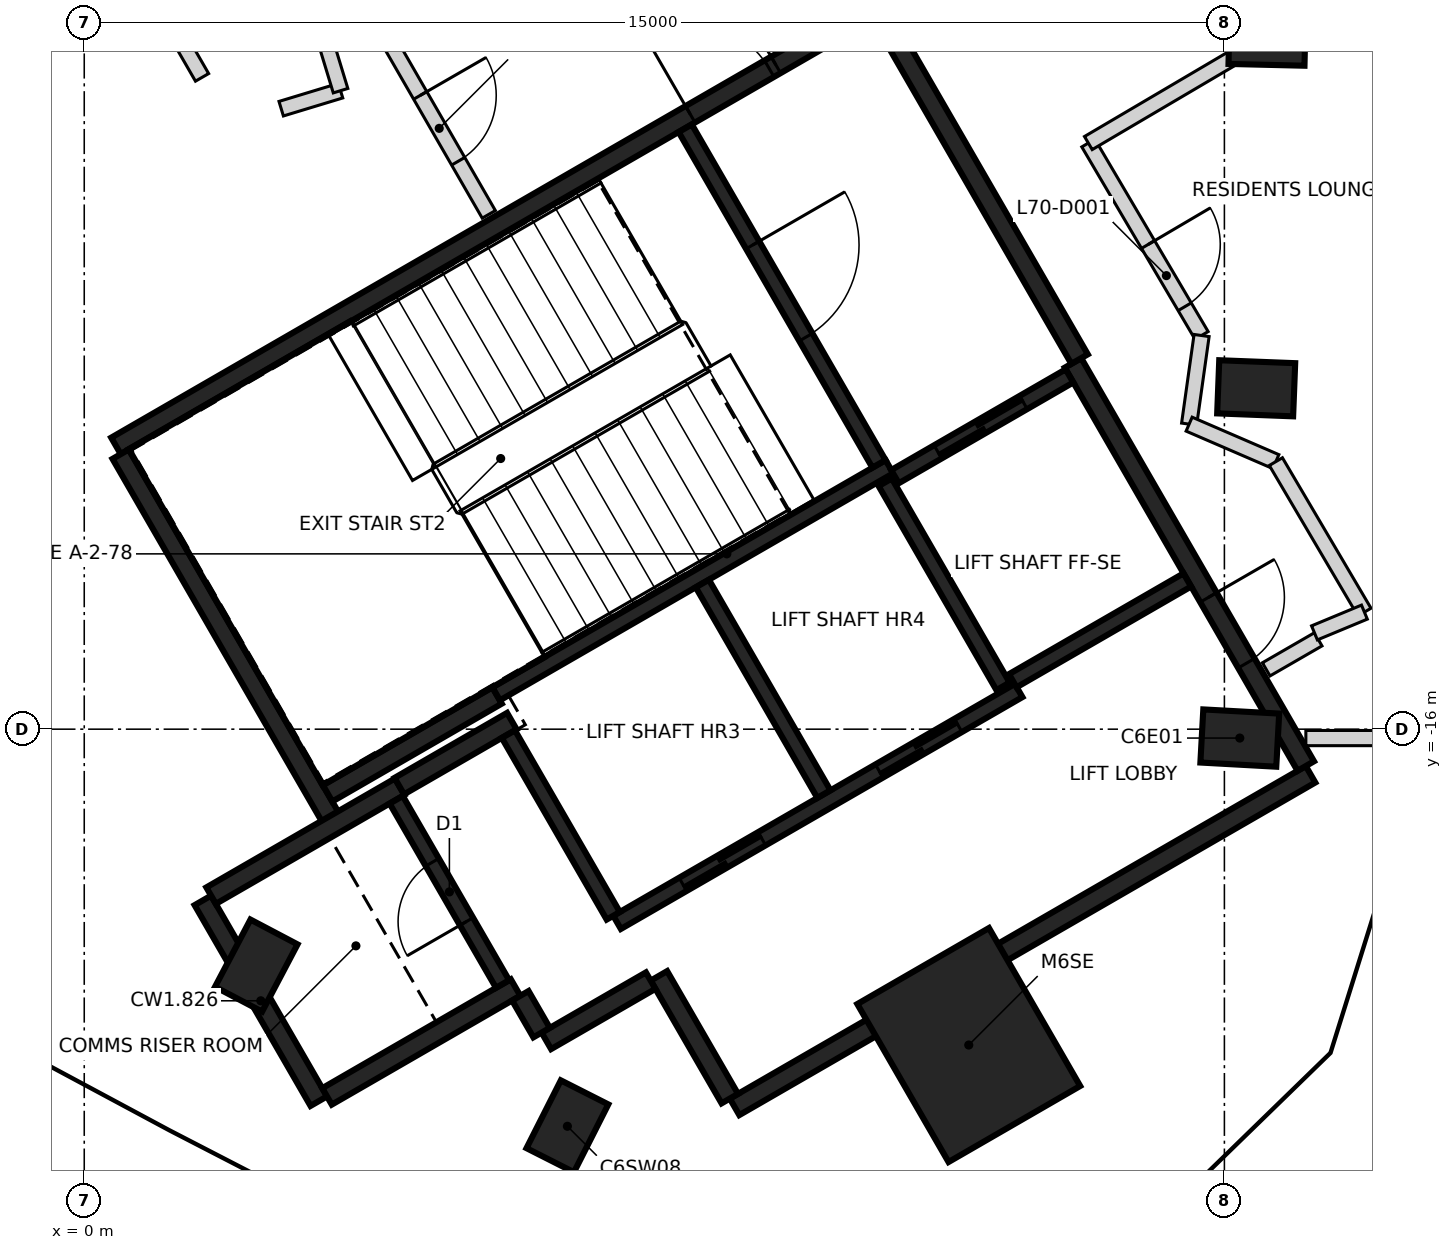
"""IFC4 building model, lengths in metres.
Left out: names, types, materials, properties, quantities, classifications, styles, units other than length and angle.
Written with IfcOpenShell. Run it as: python <this file> out.ifc"""

import sys

from ifc_helpers import new_model, si_unit, direction, frame, frame_2d, origin, origin_2d, place, context, subcontext, project, spatial, rectangle, extrude, element, fill, save


model = new_model("IFC4")
c1 = context("Model", 3, precision=1e-05, world=origin(), true_north=direction((0.0, 1.0)))
c2 = subcontext(c1, "Body", "Model", "MODEL_VIEW")
j1 = project(units=[si_unit("LENGTHUNIT", "METRE"), si_unit("PLANEANGLEUNIT", "RADIAN")], contexts=[c1])
p1 = place(None, origin())
s1 = spatial("IfcSite", under=j1, at=p1, CompositionType="ELEMENT")
p2 = place(p1, origin())
s2 = spatial("IfcBuilding", under=s1, at=p2, CompositionType="ELEMENT")
p3 = place(p2, frame((0.0, 0.0, 276.6)))
s3 = spatial("IfcBuildingStorey", under=s2, at=p3, CompositionType="ELEMENT", Elevation=276.6)
for number, where, z_axis, x_axis in (
    (1, (15.202, -16.117, -0.35), (0.0, 0.0, 1.0), (-0.998, 0.055, 0.0)),
    (2, (15.418, -11.515, -0.35), (0.0, 0.0, 1.0), (-0.999, 0.039, 0.0)),
    (3, (15.562, -6.91, -0.35), (0.0, 0.0, 1.0), (-1.0, 0.024, 0.0)),
    (4, (2.263, -19.11, -0.35), (0.0, 0.0, 1.0), (0.466, 0.885, 0.0)),
    (5, (6.356, -21.224, -0.35), (0.0, 0.0, 1.0), (0.452, 0.892, 0.0)),
):
    element("IfcColumn", number, at=place(p3, frame(where, z_axis=z_axis, x_axis=x_axis)), inside=s3, PredefinedType="COLUMN", context=c2, shape_type="SweptSolid", body=[
        extrude(rectangle(XDim=1.0, YDim=0.7, at=origin_2d()), origin(), (0.0, 0.0, 1.0), 3.6),
    ])
p4 = place(p3, frame((11.637, -20.155, -0.35), z_axis=(0.0, 0.0, 1.0), x_axis=(-0.5, 0.866025403784, 0.0)))
e6 = element("IfcColumn", 6, at=p4, inside=s3, PredefinedType="COLUMN", context=c2, shape_type="SweptSolid", body=[
    extrude(rectangle(XDim=2.4, YDim=2.0, at=origin_2d()), origin(), (0.0, 0.0, 1.0), 3.6),
])
p5 = place(p3, frame((0.417, -12.273, 0.0), z_axis=(0.0, 0.0, 1.0), x_axis=(0.866021906294, 0.500006057782, 0.0)))
e7 = element("IfcWall", 7, at=p5, inside=s3, PredefinedType="SHEAR", context=c2, shape_type="SweptSolid", body=[
    extrude(rectangle(XDim=11.55, YDim=0.25, at=frame_2d((5.775, 0.0))), origin(), (0.0, 0.0, 1.0), 3.25),
])
p6 = place(p5, frame((10.025, 0.0, 0.0)))
e8 = element("IfcOpeningElement", 8, at=p6, cuts=e7, PredefinedType="OPENING", context=c2, shape_type="SweptSolid", body=[
    extrude(rectangle(XDim=1.2, YDim=2.1, at=frame_2d((0.6, 1.05))), frame((0.0, 0.135, 0.0), z_axis=(0.0, -1.0, 0.0), x_axis=(1.0, 0.0, 0.0)), (0.0, 0.0, 1.0), 0.27),
])
p7 = place(p5, frame((8.725, 0.0, 0.0)))
e9 = element("IfcOpeningElement", 9, at=p7, cuts=e7, PredefinedType="OPENING", context=c2, shape_type="SweptSolid", body=[
    extrude(rectangle(XDim=1.2, YDim=2.1, at=frame_2d((0.6, 1.05))), frame((0.0, 0.135, 0.0), z_axis=(0.0, -1.0, 0.0), x_axis=(1.0, 0.0, 0.0)), (0.0, 0.0, 1.0), 0.27),
])
p8 = place(p3, frame((16.133, -16.594, 0.0), z_axis=(0.0, 0.0, 1.0), x_axis=(-0.866022959057, -0.500004234368, 0.0)))
e10 = element("IfcWall", 10, at=p8, inside=s3, PredefinedType="SHEAR", context=c2, shape_type="SweptSolid", body=[
    extrude(rectangle(XDim=8.75, YDim=0.25, at=frame_2d((4.375, 0.0))), origin(), (0.0, 0.0, 1.0), 3.25),
])
p9 = place(p3, frame((13.008, -11.181, 0.0), z_axis=(0.0, 0.0, 1.0), x_axis=(0.500001955336, -0.866024274868, 0.0)))
e11 = element("IfcWall", 11, at=p9, inside=s3, PredefinedType="SHEAR", context=c2, shape_type="SweptSolid", body=[
    extrude(rectangle(XDim=6.125, YDim=0.25, at=frame_2d((3.062, 0.0))), origin(), (0.0, 0.0, 1.0), 3.25),
])
p10 = place(p9, frame((3.563, 0.0, 0.0)))
e12 = element("IfcOpeningElement", 12, at=p10, cuts=e11, PredefinedType="OPENING", context=c2, shape_type="SweptSolid", body=[
    extrude(rectangle(XDim=1.0, YDim=2.1, at=frame_2d((0.5, 1.05))), frame((0.0, 0.135, 0.0), z_axis=(0.0, -1.0, 0.0), x_axis=(1.0, 0.0, 0.0)), (0.0, 0.0, 1.0), 0.27),
])
p11 = place(p3, frame((3.235, -17.153, 0.0), z_axis=(0.0, 0.0, 1.0), x_axis=(-0.500008851346, 0.866020293397, 0.0)))
e13 = element("IfcWall", 13, at=p11, inside=s3, PredefinedType="SHEAR", context=c2, shape_type="SweptSolid", body=[
    extrude(rectangle(XDim=5.51, YDim=0.25, at=frame_2d((2.755, 0.0))), origin(), (0.0, 0.0, 1.0), 3.25),
])
p12 = place(p3, frame((10.483, -6.606, 0.0), z_axis=(0.0, 0.0, 1.0), x_axis=(0.49999885962, -0.866026062182, 0.0)))
e14 = element("IfcWall", 14, at=p12, inside=s3, PredefinedType="SHEAR", context=c2, shape_type="SweptSolid", body=[
    extrude(rectangle(XDim=5.225, YDim=0.25, at=frame_2d((2.612, 0.0))), origin(), (0.0, 0.0, 1.0), 3.25),
])
p13 = place(p3, frame((3.085, -20.894, 0.0), z_axis=(0.0, 0.0, 1.0), x_axis=(-0.499978833458, 0.866037623948, 0.0)))
e15 = element("IfcWall", 15, at=p13, inside=s3, PredefinedType="SHEAR", context=c2, shape_type="SweptSolid", body=[
    extrude(rectangle(XDim=3.05, YDim=0.25, at=frame_2d((1.525, 0.0))), origin(), (0.0, 0.0, 1.0), 3.25),
])
p14 = place(p3, frame((1.669, -18.19, 0.0), z_axis=(0.0, 0.0, 1.0), x_axis=(0.866042235819, 0.499970844928, 0.0)))
e16 = element("IfcWall", 16, at=p14, inside=s3, PredefinedType="SHEAR", context=c2, shape_type="SweptSolid", body=[
    extrude(rectangle(XDim=2.865, YDim=0.25, at=frame_2d((1.432, 0.0))), origin(), (0.0, 0.0, 1.0), 3.25),
])
p15 = place(p3, frame((5.675, -19.399, 0.0), z_axis=(0.0, 0.0, 1.0), x_axis=(-0.866026637627, -0.499997862916, 0.0)))
e17 = element("IfcWall", 17, at=p15, inside=s3, PredefinedType="SHEAR", context=c2, shape_type="SweptSolid", body=[
    extrude(rectangle(XDim=2.865, YDim=0.25, at=frame_2d((1.432, 0.0))), origin(), (0.0, 0.0, 1.0), 3.25),
])
p16 = place(p3, frame((5.431, -15.556, 0.0), z_axis=(0.0, 0.0, 1.0), x_axis=(-0.866022940537, -0.500004266446, 0.0)))
e18 = element("IfcWall", 18, at=p16, inside=s3, PredefinedType="SHEAR", context=c2, shape_type="SweptSolid", body=[
    extrude(rectangle(XDim=2.575, YDim=0.25, at=frame_2d((1.287, 0.0))), origin(), (0.0, 0.0, 1.0), 3.25),
])
p17 = place(p3, frame((8.493, -20.86, 0.0), z_axis=(0.0, 0.0, 1.0), x_axis=(-0.500039802285, 0.866002422705, 0.0)))
e19 = element("IfcWall", 19, at=p17, inside=s3, PredefinedType="SHEAR", context=c2, shape_type="SweptSolid", body=[
    extrude(rectangle(XDim=1.865, YDim=0.25, at=frame_2d((0.932, 0.0))), origin(), (0.0, 0.0, 1.0), 3.25),
])
p18 = place(p3, frame((4.145, -16.749, 0.0), z_axis=(0.0, 0.0, 1.0), x_axis=(0.866038183914, 0.499977863513, 0.0)))
e20 = element("IfcWall", 20, at=p18, inside=s3, PredefinedType="SHEAR", context=c2, shape_type="SweptSolid", body=[
    extrude(rectangle(XDim=1.71, YDim=0.25, at=frame_2d((0.855, 0.0))), origin(), (0.0, 0.0, 1.0), 3.25),
])
p19 = place(p3, frame((7.452, -19.308, 0.0), z_axis=(0.0, 0.0, 1.0), x_axis=(-0.866044474677, -0.49996696679, 0.0)))
e21 = element("IfcWall", 21, at=p19, inside=s3, PredefinedType="SHEAR", context=c2, shape_type="SweptSolid", body=[
    extrude(rectangle(XDim=1.584, YDim=0.25, at=frame_2d((0.792, 0.0))), origin(), (0.0, 0.0, 1.0), 3.25),
])
p20 = place(p3, frame((6.017, -19.992, 0.0), z_axis=(0.0, 0.0, 1.0), x_axis=(-0.500364886717, 0.865814633822, 0.0)))
e22 = element("IfcWall", 22, at=p20, inside=s3, PredefinedType="SHEAR", context=c2, shape_type="SweptSolid", body=[
    extrude(rectangle(XDim=0.559, YDim=0.25, at=frame_2d((0.28, 0.0))), origin(), (0.0, 0.0, 1.0), 3.25),
])
p21 = place(p3, frame((5.419, -15.534, 0.0), z_axis=(0.0, 0.0, 1.0), x_axis=(0.866029065029, 0.499993658486, 0.0)))
e23 = element("IfcWall", 23, at=p21, inside=s3, PredefinedType="SHEAR", context=c2, shape_type="SweptSolid", body=[
    extrude(rectangle(XDim=5.974, YDim=0.2, at=frame_2d((2.987, 0.0))), origin(), (0.0, 0.0, 1.0), 3.25),
])
p22 = place(p3, frame((7.01, -18.542, 0.0), z_axis=(0.0, 0.0, 1.0), x_axis=(0.866030299012, 0.499991521122, 0.0)))
e24 = element("IfcWall", 24, at=p22, inside=s3, PredefinedType="SHEAR", context=c2, shape_type="SweptSolid", body=[
    extrude(rectangle(XDim=6.1, YDim=0.2, at=frame_2d((3.05, 0.0))), origin(), (0.0, 0.0, 1.0), 3.25),
])
p23 = place(p22, frame((1.0, 0.0, 0.0)))
e25 = element("IfcOpeningElement", 25, at=p23, cuts=e24, PredefinedType="OPENING", context=c2, shape_type="SweptSolid", body=[
    extrude(rectangle(XDim=1.2, YDim=2.1, at=frame_2d((0.6, 1.05))), frame((0.0, 0.11, 0.0), z_axis=(0.0, -1.0, 0.0), x_axis=(1.0, 0.0, 0.0)), (0.0, 0.0, 1.0), 0.22),
])
p24 = place(p22, frame((3.982, 0.0, 0.0)))
e26 = element("IfcOpeningElement", 26, at=p24, cuts=e24, PredefinedType="OPENING", context=c2, shape_type="SweptSolid", body=[
    extrude(rectangle(XDim=1.2, YDim=2.1, at=frame_2d((0.6, 1.05))), frame((0.0, 0.11, 0.0), z_axis=(0.0, -1.0, 0.0), x_axis=(1.0, 0.0, 0.0)), (0.0, 0.0, 1.0), 0.22),
])
p25 = place(p3, frame((7.906, -8.094, 0.0), z_axis=(0.0, 0.0, 1.0), x_axis=(0.500027839223, -0.866009330205, 0.0)))
e27 = element("IfcWall", 27, at=p25, inside=s3, PredefinedType="SHEAR", context=c2, shape_type="SweptSolid", body=[
    extrude(rectangle(XDim=5.098, YDim=0.2, at=frame_2d((2.549, 0.0))), origin(), (0.0, 0.0, 1.0), 3.25),
])
p26 = place(p25, frame((1.774, 0.0, 0.0)))
e28 = element("IfcOpeningElement", 28, at=p26, cuts=e27, PredefinedType="OPENING", context=c2, shape_type="SweptSolid", body=[
    extrude(rectangle(XDim=1.4, YDim=2.1, at=frame_2d((0.7, 1.05))), frame((0.0, 0.11, 0.0), z_axis=(0.0, -1.0, 0.0), x_axis=(1.0, 0.0, 0.0)), (0.0, 0.0, 1.0), 0.22),
])
p27 = place(p3, frame((8.132, -14.084, 0.0), z_axis=(0.0, 0.0, 1.0), x_axis=(0.499997778408, -0.866026686418, 0.0)))
e29 = element("IfcWall", 29, at=p27, inside=s3, PredefinedType="SHEAR", context=c2, shape_type="SweptSolid", body=[
    extrude(rectangle(XDim=3.198, YDim=0.2, at=frame_2d((1.599, 0.0))), origin(), (0.0, 0.0, 1.0), 3.25),
])
p28 = place(p3, frame((5.503, -19.352, 0.0), z_axis=(0.0, 0.0, 1.0), x_axis=(-0.499986818241, 0.866033014143, 0.0)))
e30 = element("IfcWall", 30, at=p28, inside=s3, PredefinedType="SHEAR", context=c2, shape_type="SweptSolid", body=[
    extrude(rectangle(XDim=2.798, YDim=0.2, at=frame_2d((1.399, 0.0))), origin(), (0.0, 0.0, 1.0), 3.25),
])
p29 = place(p28, frame((0.949, 0.0, 0.0)))
e31 = element("IfcOpeningElement", 31, at=p29, cuts=e30, PredefinedType="OPENING", context=c2, shape_type="SweptSolid", body=[
    extrude(rectangle(XDim=0.9, YDim=2.1, at=frame_2d((0.45, 1.05))), frame((0.0, 0.11, 0.0), z_axis=(0.0, -1.0, 0.0), x_axis=(1.0, 0.0, 0.0)), (0.0, 0.0, 1.0), 0.22),
])
p30 = place(p3, frame((6.96, -18.455, 0.0), z_axis=(0.0, 0.0, 1.0), x_axis=(-0.499926705758, 0.866067716099, 0.0)))
e32 = element("IfcWall", 32, at=p30, inside=s3, PredefinedType="SHEAR", context=c2, shape_type="SweptSolid", body=[
    extrude(rectangle(XDim=2.759, YDim=0.2, at=frame_2d((1.38, 0.0))), origin(), (0.0, 0.0, 1.0), 3.25),
])
p31 = place(p3, frame((12.088, -15.437, 0.0), z_axis=(0.0, 0.0, 1.0), x_axis=(-0.500026960575, 0.86600983753, 0.0)))
e33 = element("IfcWall", 33, at=p31, inside=s3, PredefinedType="SHEAR", context=c2, shape_type="SweptSolid", body=[
    extrude(rectangle(XDim=3.1, YDim=0.2, at=frame_2d((1.55, 0.0))), origin(), (0.0, 0.0, 1.0), 3.25),
])
p32 = place(p3, frame((10.666, -12.678, 0.0), z_axis=(0.0, 0.0, 1.0), x_axis=(0.866018407898, 0.500012117035, 0.0)))
e34 = element("IfcWall", 34, at=p32, inside=s3, PredefinedType="SHEAR", context=c2, shape_type="SweptSolid", body=[
    extrude(rectangle(XDim=2.651, YDim=0.2, at=frame_2d((1.325, 0.0))), origin(), (0.0, 0.0, 1.0), 3.25),
])
p33 = place(p32, frame((0.652, 0.0, 0.0)))
e35 = element("IfcOpeningElement", 35, at=p33, cuts=e34, PredefinedType="OPENING", context=c2, shape_type="SweptSolid", body=[
    extrude(rectangle(XDim=1.3, YDim=2.1, at=frame_2d((0.65, 1.05))), frame((0.0, 0.11, 0.0), z_axis=(0.0, -1.0, 0.0), x_axis=(1.0, 0.0, 0.0)), (0.0, 0.0, 1.0), 0.22),
])
p34 = place(p3, frame((14.512, -14.037, 0.0), z_axis=(0.0, 0.0, 1.0), x_axis=(-0.866018407898, -0.500012117035, 0.0)))
e36 = element("IfcWall", 36, at=p34, inside=s3, PredefinedType="SHEAR", context=c2, shape_type="SweptSolid", body=[
    extrude(rectangle(XDim=2.651, YDim=0.2, at=frame_2d((1.325, 0.0))), origin(), (0.0, 0.0, 1.0), 3.25),
])
p35 = place(p3, frame((1.148, -6.728, 0.0), z_axis=(0.0, 0.0, 1.0), x_axis=(0.499696187967, -0.866200738704, 0.0)))
e37 = element("IfcWall", 37, at=p35, inside=s3, PredefinedType="PARTITIONING", context=c2, shape_type="SweptSolid", body=[
    extrude(rectangle(XDim=0.805, YDim=0.2, at=frame_2d((0.402, 0.0))), origin(), (0.0, 0.0, 1.0), 3.25),
])
p36 = place(p3, frame((2.591, -7.837, 0.0), z_axis=(0.0, 0.0, 1.0), x_axis=(0.956974070788, 0.290173444409, 0.0)))
e38 = element("IfcWall", 38, at=p36, inside=s3, PredefinedType="PARTITIONING", context=c2, shape_type="SweptSolid", body=[
    extrude(rectangle(XDim=0.816, YDim=0.2, at=frame_2d((0.408, 0.0))), origin(), (0.0, 0.0, 1.0), 3.25),
])
p37 = place(p3, frame((3.11, -6.739, 0.0), z_axis=(0.0, 0.0, 1.0), x_axis=(0.291053676179, -0.95670672496, 0.0)))
e39 = element("IfcWall", 39, at=p37, inside=s3, PredefinedType="PARTITIONING", context=c2, shape_type="SweptSolid", body=[
    extrude(rectangle(XDim=0.9, YDim=0.2, at=frame_2d((0.45, 0.0))), origin(), (0.0, 0.0, 1.0), 3.25),
])
p38 = place(p3, frame((3.987, -6.911, 0.0), z_axis=(0.0, 0.0, 1.0), x_axis=(0.499458942258, -0.866337558345, 0.0)))
e40 = element("IfcWall", 40, at=p38, inside=s3, PredefinedType="PARTITIONING", context=c2, shape_type="SweptSolid", body=[
    extrude(rectangle(XDim=2.674, YDim=0.2, at=frame_2d((1.337, 0.0))), origin(), (0.0, 0.0, 1.0), 3.25),
])
p39 = place(p38, frame((0.867, 0.0, 0.0)))
e41 = element("IfcOpeningElement", 41, at=p39, cuts=e40, PredefinedType="OPENING", context=c2, shape_type="SweptSolid", body=[
    extrude(rectangle(XDim=1.0, YDim=2.1, at=frame_2d((0.5, 1.05))), frame((0.0, 0.11, 0.0), z_axis=(0.0, -1.0, 0.0), x_axis=(1.0, 0.0, 0.0)), (0.0, 0.0, 1.0), 0.22),
])
p40 = place(p3, frame((13.21, -8.289, 0.0), z_axis=(0.0, 0.0, 1.0), x_axis=(0.507314348132, -0.861761076041, 0.0)))
e42 = element("IfcWall", 42, at=p40, inside=s3, PredefinedType="PARTITIONING", context=c2, shape_type="SweptSolid", body=[
    extrude(rectangle(XDim=2.937, YDim=0.2, at=frame_2d((1.469, 0.0))), origin(), (0.0, 0.0, 1.0), 3.25),
])
p41 = place(p40, frame((1.549, 0.0, 0.0)))
e43 = element("IfcOpeningElement", 43, at=p41, cuts=e42, PredefinedType="OPENING", context=c2, shape_type="SweptSolid", body=[
    extrude(rectangle(XDim=0.95, YDim=2.1, at=frame_2d((0.475, 1.05))), frame((0.0, 0.11, 0.0), z_axis=(0.0, -1.0, 0.0), x_axis=(1.0, 0.0, 0.0)), (0.0, 0.0, 1.0), 0.22),
])
p42 = place(p3, frame((13.21, -8.289, 0.0), z_axis=(0.0, 0.0, 1.0), x_axis=(0.861654599216, 0.507495174017, 0.0)))
e44 = element("IfcWall", 44, at=p42, inside=s3, PredefinedType="PARTITIONING", context=c2, shape_type="SweptSolid", body=[
    extrude(rectangle(XDim=2.38, YDim=0.2, at=frame_2d((1.19, 0.0))), origin(), (0.0, 0.0, 1.0), 3.25),
])
p43 = place(p3, frame((14.536, -11.987, 0.0), z_axis=(0.0, 0.0, 1.0), x_axis=(0.139331074948, 0.990245854096, 0.0)))
e45 = element("IfcWall", 45, at=p43, inside=s3, PredefinedType="PARTITIONING", context=c2, shape_type="SweptSolid", body=[
    extrude(rectangle(XDim=1.177, YDim=0.2, at=frame_2d((0.589, 0.0))), origin(), (0.0, 0.0, 1.0), 3.25),
])
p44 = place(p3, frame((14.536, -11.987, 0.0), z_axis=(0.0, 0.0, 1.0), x_axis=(0.918013607861, -0.396548881958, 0.0)))
e46 = element("IfcWall", 46, at=p44, inside=s3, PredefinedType="PARTITIONING", context=c2, shape_type="SweptSolid", body=[
    extrude(rectangle(XDim=1.243, YDim=0.2, at=frame_2d((0.622, 0.0))), origin(), (0.0, 0.0, 1.0), 2.35),
])
p45 = place(p3, frame((15.55, -15.213, 0.0), z_axis=(0.0, 0.0, 1.0), x_axis=(0.865989998118, 0.500061319399, 0.0)))
e47 = element("IfcWall", 47, at=p45, inside=s3, PredefinedType="PARTITIONING", context=c2, shape_type="SweptSolid", body=[
    extrude(rectangle(XDim=0.79, YDim=0.2, at=frame_2d((0.395, 0.0))), origin(), (0.0, 0.0, 1.0), 3.25),
])
p46 = place(p3, frame((15.677, -12.48, 0.0), z_axis=(0.0, 0.0, 1.0), x_axis=(0.507256975253, -0.861794848591, 0.0)))
e48 = element("IfcWall", 48, at=p46, inside=s3, PredefinedType="PARTITIONING", context=c2, shape_type="SweptSolid", body=[
    extrude(rectangle(XDim=2.297, YDim=0.2, at=frame_2d((1.148, 0.0))), origin(), (0.0, 0.0, 1.0), 3.25),
])
p47 = place(p3, frame((16.185, -14.733, 0.0), z_axis=(0.0, 0.0, 1.0), x_axis=(0.923472400107, 0.38366486188, 0.0)))
e49 = element("IfcWall", 49, at=p47, inside=s3, PredefinedType="PARTITIONING", context=c2, shape_type="SweptSolid", body=[
    extrude(rectangle(XDim=0.711, YDim=0.2, at=frame_2d((0.356, 0.0))), origin(), (0.0, 0.0, 1.0), 3.25),
])
p48 = place(p3, frame((16.072, -16.117, 0.0), z_axis=(0.0, 0.0, 1.0), x_axis=(1.0, 0.0, 0.0)))
e50 = element("IfcWall", 50, at=p48, inside=s3, PredefinedType="PARTITIONING", context=c2, shape_type="SweptSolid", body=[
    extrude(rectangle(XDim=1.578, YDim=0.2, at=frame_2d((0.789, 0.0))), origin(), (0.0, 0.0, 1.0), 3.25),
])
p49 = place(p33, origin())
e51 = element("IfcDoor", 51, at=p49, inside=s3, OperationType="SLIDING_TO_LEFT", PredefinedType="DOOR", context=c2, shape_type="SweptSolid", body=[
    extrude(rectangle(XDim=1.3, YDim=2.1, at=frame_2d((0.65, 1.05))), frame((0.0, 0.025, 0.0), z_axis=(0.0, -1.0, 0.0), x_axis=(1.0, 0.0, 0.0)), (0.0, 0.0, 1.0), 0.05),
])
fill(e35, e51)
p50 = place(p23, origin())
e52 = element("IfcDoor", 52, at=p50, inside=s3, OperationType="DOUBLE_DOOR_SLIDING", PredefinedType="DOOR", context=c2, shape_type="SweptSolid", body=[
    extrude(rectangle(XDim=1.2, YDim=2.1, at=frame_2d((0.6, 1.05))), frame((0.0, 0.025, 0.0), z_axis=(0.0, -1.0, 0.0), x_axis=(1.0, 0.0, 0.0)), (0.0, 0.0, 1.0), 0.05),
])
fill(e25, e52)
p51 = place(p24, origin())
e53 = element("IfcDoor", 53, at=p51, inside=s3, OperationType="DOUBLE_DOOR_SLIDING", PredefinedType="DOOR", context=c2, shape_type="SweptSolid", body=[
    extrude(rectangle(XDim=1.2, YDim=2.1, at=frame_2d((0.6, 1.05))), frame((0.0, 0.025, 0.0), z_axis=(0.0, -1.0, 0.0), x_axis=(1.0, 0.0, 0.0)), (0.0, 0.0, 1.0), 0.05),
])
fill(e26, e53)
p52 = place(p10, origin())
e54 = element("IfcDoor", 54, at=p52, inside=s3, OperationType="SINGLE_SWING_LEFT", PredefinedType="DOOR", context=c2, shape_type="SweptSolid", body=[
    extrude(rectangle(XDim=1.0, YDim=2.1, at=frame_2d((0.5, 1.05))), frame((0.0, 0.025, 0.0), z_axis=(0.0, -1.0, 0.0), x_axis=(1.0, 0.0, 0.0)), (0.0, 0.0, 1.0), 0.05),
])
fill(e12, e54)
p53 = place(p6, origin())
e55 = element("IfcDoor", 55, at=p53, inside=s3, OperationType="SINGLE_SWING_LEFT", PredefinedType="DOOR", context=c2, shape_type="SweptSolid", body=[
    extrude(rectangle(XDim=1.2, YDim=2.1, at=frame_2d((0.6, 1.05))), frame((0.0, 0.025, 0.0), z_axis=(0.0, -1.0, 0.0), x_axis=(1.0, 0.0, 0.0)), (0.0, 0.0, 1.0), 0.05),
])
fill(e8, e55)
p54 = place(p7, origin())
e56 = element("IfcDoor", 56, at=p54, inside=s3, OperationType="SINGLE_SWING_RIGHT", PredefinedType="DOOR", context=c2, shape_type="SweptSolid", body=[
    extrude(rectangle(XDim=1.2, YDim=2.1, at=frame_2d((0.6, 1.05))), frame((0.0, 0.025, 0.0), z_axis=(0.0, -1.0, 0.0), x_axis=(1.0, 0.0, 0.0)), (0.0, 0.0, 1.0), 0.05),
])
fill(e9, e56)
p55 = place(p26, origin())
e57 = element("IfcDoor", 57, at=p55, inside=s3, OperationType="SINGLE_SWING_LEFT", PredefinedType="DOOR", context=c2, shape_type="SweptSolid", body=[
    extrude(rectangle(XDim=1.4, YDim=2.1, at=frame_2d((0.7, 1.05))), frame((0.0, 0.025, 0.0), z_axis=(0.0, -1.0, 0.0), x_axis=(1.0, 0.0, 0.0)), (0.0, 0.0, 1.0), 0.05),
])
fill(e28, e57)
p56 = place(p29, origin())
e58 = element("IfcDoor", 58, at=p56, inside=s3, OperationType="SINGLE_SWING_RIGHT", PredefinedType="DOOR", context=c2, shape_type="SweptSolid", body=[
    extrude(rectangle(XDim=0.9, YDim=2.1, at=frame_2d((0.45, 1.05))), frame((0.0, 0.025, 0.0), z_axis=(0.0, -1.0, 0.0), x_axis=(1.0, 0.0, 0.0)), (0.0, 0.0, 1.0), 0.05),
])
fill(e31, e58)
p57 = place(p41, origin())
e59 = element("IfcDoor", 59, at=p57, inside=s3, OperationType="SINGLE_SWING_LEFT", PredefinedType="DOOR", context=c2, shape_type="SweptSolid", body=[
    extrude(rectangle(XDim=0.95, YDim=2.1, at=frame_2d((0.475, 1.05))), frame((0.0, 0.025, 0.0), z_axis=(0.0, -1.0, 0.0), x_axis=(1.0, 0.0, 0.0)), (0.0, 0.0, 1.0), 0.05),
])
fill(e43, e59)
p58 = place(p39, frame((1.0, 0.0, 0.0), z_axis=(0.0, 0.0, 1.0), x_axis=(-1.0, 0.0, 0.0)))
e60 = element("IfcDoor", 60, at=p58, inside=s3, OperationType="SINGLE_SWING_LEFT", PredefinedType="DOOR", context=c2, shape_type="SweptSolid", body=[
    extrude(rectangle(XDim=1.0, YDim=2.1, at=frame_2d((0.5, 1.05))), frame((0.0, 0.025, 0.0), z_axis=(0.0, -1.0, 0.0), x_axis=(1.0, 0.0, 0.0)), (0.0, 0.0, 1.0), 0.05),
])
fill(e41, e60)
save(model, sys.argv[1])
